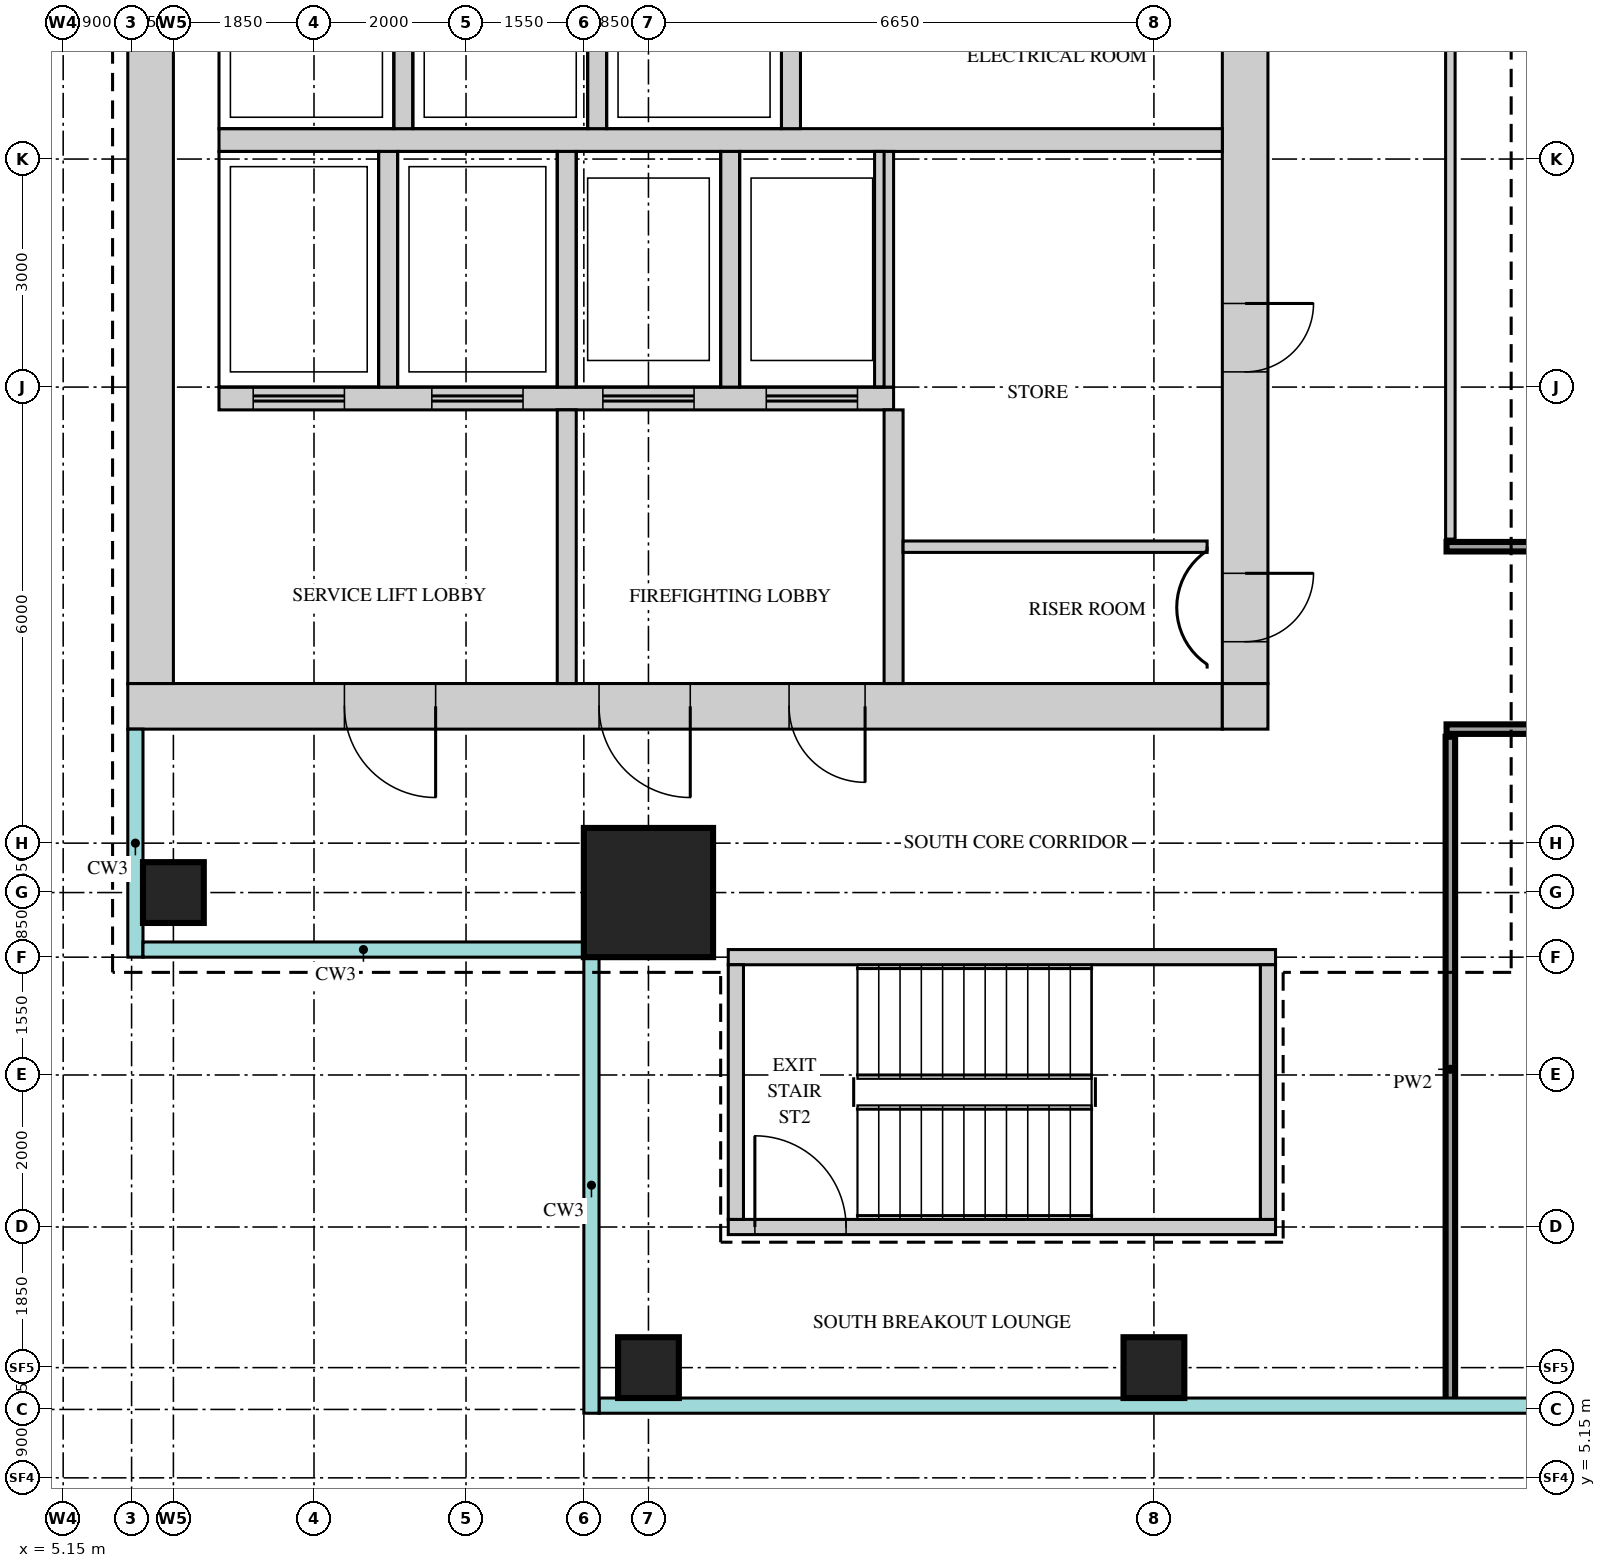
"""IFC4 building model, lengths in metres.
Left out: names, types, materials, properties, quantities, classifications, styles, units other than length and angle.
Written with IfcOpenShell. Run it as: python <this file> out.ifc"""

import sys

from ifc_helpers import new_model, si_unit, direction, frame, frame_2d, origin, origin_2d, place, context, subcontext, project, spatial, rectangle, extrude, source, transform, mapped, element, fill, save


model = new_model("IFC4")
c1 = context("Model", 3, precision=1e-05, world=origin(), true_north=direction((0.0, 1.0)))
c2 = subcontext(c1, "Body", "Model", "MODEL_VIEW")
j1 = project(units=[si_unit("LENGTHUNIT", "METRE"), si_unit("PLANEANGLEUNIT", "RADIAN")], contexts=[c1])
p1 = place(None, origin())
s1 = spatial("IfcSite", under=j1, at=p1, CompositionType="ELEMENT")
p2 = place(p1, origin())
s2 = spatial("IfcBuilding", under=s1, at=p2, CompositionType="ELEMENT")
p3 = place(p2, frame((0.0, 0.0, 326.2)))
s3 = spatial("IfcBuildingStorey", under=s2, at=p3, CompositionType="ELEMENT", Elevation=326.2)
m1 = source(origin(), c2, "Body", "SweptSolid", [
    extrude(rectangle(XDim=14.4, YDim=0.6, at=frame_2d((7.2, 0.0))), origin(), (0.0, 0.0, 1.0), 3.75),
])
p4 = place(p3, frame((6.0, 15.3, 0.0), z_axis=(0.0, 0.0, 1.0), x_axis=(1.0, 0.0, 0.0)))
e1 = element("IfcWall", 1, at=p4, inside=s3, PredefinedType="SHEAR", context=c2, shape_type="MappedRepresentation", body=[
    mapped(m1, transform((0.0, 0.0, 0.0))),
])
m2 = source(origin(), c2, "Body", "SweptSolid", [
    extrude(rectangle(XDim=1.2, YDim=2.1, at=frame_2d((0.6, 1.05))), frame((0.0, 0.31, 0.0), z_axis=(0.0, -1.0, 0.0), x_axis=(1.0, 0.0, 0.0)), (0.0, 0.0, 1.0), 0.62),
])
p5 = place(p4, frame((6.2, 0.0, 0.0)))
e2 = element("IfcOpeningElement", 2, at=p5, cuts=e1, PredefinedType="OPENING", context=c2, shape_type="MappedRepresentation", body=[
    mapped(m2, transform((0.0, 0.0, 0.0))),
])
p6 = place(p4, frame((2.85, 0.0, 0.0)))
e3 = element("IfcOpeningElement", 3, at=p6, cuts=e1, PredefinedType="OPENING", context=c2, shape_type="MappedRepresentation", body=[
    mapped(m2, transform((0.0, 0.0, 0.0))),
])
m3 = source(origin(), c2, "Body", "SweptSolid", [
    extrude(rectangle(XDim=1.0, YDim=2.1, at=frame_2d((0.5, 1.05))), frame((0.0, 0.31, 0.0), z_axis=(0.0, -1.0, 0.0), x_axis=(1.0, 0.0, 0.0)), (0.0, 0.0, 1.0), 0.62),
])
p7 = place(p4, frame((8.7, 0.0, 0.0)))
e4 = element("IfcOpeningElement", 4, at=p7, cuts=e1, PredefinedType="OPENING", context=c2, shape_type="MappedRepresentation", body=[
    mapped(m3, transform((0.0, 0.0, 0.0))),
])
m4 = source(origin(), c2, "Body", "SweptSolid", [
    extrude(rectangle(XDim=0.6, YDim=0.6, at=frame_2d((0.3, 0.0))), origin(), (0.0, 0.0, 1.0), 3.75),
])
p8 = place(p3, frame((20.4, 15.3, 0.0), z_axis=(0.0, 0.0, 1.0), x_axis=(1.0, 0.0, 0.0)))
e5 = element("IfcWall", 5, at=p8, inside=s3, PredefinedType="SHEAR", context=c2, shape_type="MappedRepresentation", body=[
    mapped(m4, transform((0.0, 0.0, 0.0))),
])
m5 = source(origin(), c2, "Body", "SweptSolid", [
    extrude(rectangle(XDim=22.8, YDim=0.6, at=frame_2d((11.4, 0.0))), origin(), (0.0, 0.0, 1.0), 3.75),
])
p9 = place(p3, frame((20.7, 15.6, 0.0), z_axis=(0.0, 0.0, 1.0), x_axis=(0.0, 1.0, 0.0)))
e6 = element("IfcWall", 6, at=p9, inside=s3, PredefinedType="SHEAR", context=c2, shape_type="MappedRepresentation", body=[
    mapped(m5, transform((0.0, 0.0, 0.0))),
])
m6 = source(origin(), c2, "Body", "SweptSolid", [
    extrude(rectangle(XDim=1.8, YDim=2.1, at=frame_2d((0.9, 1.05))), frame((0.0, 0.31, 0.0), z_axis=(0.0, -1.0, 0.0), x_axis=(1.0, 0.0, 0.0)), (0.0, 0.0, 1.0), 0.62),
])
p10 = place(p9, frame((10.9, 0.0, 0.0)))
e7 = element("IfcOpeningElement", 7, at=p10, cuts=e6, PredefinedType="OPENING", context=c2, shape_type="MappedRepresentation", body=[
    mapped(m6, transform((0.0, 0.0, 0.0))),
])
m7 = source(origin(), c2, "Body", "SweptSolid", [
    extrude(rectangle(XDim=0.9, YDim=2.1, at=frame_2d((0.45, 1.05))), frame((0.0, 0.31, 0.0), z_axis=(0.0, -1.0, 0.0), x_axis=(1.0, 0.0, 0.0)), (0.0, 0.0, 1.0), 0.62),
])
p11 = place(p9, frame((0.55, 0.0, 0.0)))
e8 = element("IfcOpeningElement", 8, at=p11, cuts=e6, PredefinedType="OPENING", context=c2, shape_type="MappedRepresentation", body=[
    mapped(m7, transform((0.0, 0.0, 0.0))),
])
p12 = place(p9, frame((4.1, 0.0, 0.0)))
e9 = element("IfcOpeningElement", 9, at=p12, cuts=e6, PredefinedType="OPENING", context=c2, shape_type="MappedRepresentation", body=[
    mapped(m7, transform((0.0, 0.0, 0.0))),
])
p13 = place(p3, frame((6.3, 15.6, 0.0), z_axis=(0.0, 0.0, 1.0), x_axis=(0.0, 1.0, 0.0)))
e10 = element("IfcWall", 10, at=p13, inside=s3, PredefinedType="SHEAR", context=c2, shape_type="MappedRepresentation", body=[
    mapped(m5, transform((0.0, 0.0, 0.0))),
])
m8 = source(origin(), c2, "Body", "SweptSolid", [
    extrude(rectangle(XDim=7.2, YDim=0.2, at=frame_2d((3.6, 0.0))), origin(), (0.0, 0.0, 1.0), 3.75),
])
p14 = place(p3, frame((13.9, 12.0, 0.0), z_axis=(0.0, 0.0, 1.0), x_axis=(1.0, 0.0, 0.0)))
e11 = element("IfcWall", 11, at=p14, inside=s3, PredefinedType="SHEAR", context=c2, shape_type="MappedRepresentation", body=[
    mapped(m8, transform((0.0, 0.0, 0.0))),
])
p15 = place(p3, frame((13.9, 8.45, 0.0), z_axis=(0.0, 0.0, 1.0), x_axis=(1.0, 0.0, 0.0)))
e12 = element("IfcWall", 12, at=p15, inside=s3, PredefinedType="SHEAR", context=c2, shape_type="MappedRepresentation", body=[
    mapped(m8, transform((0.0, 0.0, 0.0))),
])
m9 = source(origin(), c2, "Body", "SweptSolid", [
    extrude(rectangle(XDim=1.2, YDim=2.1, at=frame_2d((0.6, 1.05))), frame((0.0, 0.11, 0.0), z_axis=(0.0, -1.0, 0.0), x_axis=(1.0, 0.0, 0.0)), (0.0, 0.0, 1.0), 0.22),
])
p16 = place(p15, frame((0.35, 0.0, 0.0)))
e13 = element("IfcOpeningElement", 13, at=p16, cuts=e12, PredefinedType="OPENING", context=c2, shape_type="MappedRepresentation", body=[
    mapped(m9, transform((0.0, 0.0, 0.0))),
])
m10 = source(origin(), c2, "Body", "SweptSolid", [
    extrude(rectangle(XDim=3.35, YDim=0.2, at=frame_2d((1.675, 0.0))), origin(), (0.0, 0.0, 1.0), 3.75),
])
for number, where, z_axis, x_axis in (
    (14, (21.0, 8.55, 0.0), (0.0, 0.0, 1.0), (0.0, 1.0, 0.0)),
    (15, (14.0, 8.55, 0.0), (0.0, 0.0, 1.0), (0.0, 1.0, 0.0)),
):
    element("IfcWall", number, at=place(p3, frame(where, z_axis=z_axis, x_axis=x_axis)), inside=s3, PredefinedType="SHEAR", context=c2, shape_type="MappedRepresentation", body=[
        mapped(m10, transform((0.0, 0.0, 0.0))),
    ])
m11 = source(origin(), c2, "Body", "SweptSolid", [
    extrude(rectangle(XDim=13.2, YDim=0.3, at=frame_2d((6.6, 0.0))), origin(), (0.0, 0.0, 1.0), 3.75),
])
p17 = place(p3, frame((7.2, 22.75, 0.0), z_axis=(0.0, 0.0, 1.0), x_axis=(1.0, 0.0, 0.0)))
e16 = element("IfcWall", 16, at=p17, inside=s3, PredefinedType="STANDARD", context=c2, shape_type="MappedRepresentation", body=[
    mapped(m11, transform((0.0, 0.0, 0.0))),
])
m12 = source(origin(), c2, "Body", "SweptSolid", [
    extrude(rectangle(XDim=8.875, YDim=0.3, at=frame_2d((4.438, 0.0))), origin(), (0.0, 0.0, 1.0), 3.75),
])
p18 = place(p3, frame((7.2, 19.35, 0.0), z_axis=(0.0, 0.0, 1.0), x_axis=(1.0, 0.0, 0.0)))
e17 = element("IfcWall", 17, at=p18, inside=s3, PredefinedType="STANDARD", context=c2, shape_type="MappedRepresentation", body=[
    mapped(m12, transform((0.0, 0.0, 0.0))),
])
m13 = source(origin(), c2, "Body", "SweptSolid", [
    extrude(rectangle(XDim=1.2, YDim=2.1, at=frame_2d((0.6, 1.05))), frame((0.0, 0.16, 0.0), z_axis=(0.0, -1.0, 0.0), x_axis=(1.0, 0.0, 0.0)), (0.0, 0.0, 1.0), 0.32),
])
p19 = place(p18, frame((0.45, 0.0, 0.0)))
e18 = element("IfcOpeningElement", 18, at=p19, cuts=e17, PredefinedType="OPENING", context=c2, shape_type="MappedRepresentation", body=[
    mapped(m13, transform((0.0, 0.0, 0.0))),
])
p20 = place(p18, frame((2.8, 0.0, 0.0)))
e19 = element("IfcOpeningElement", 19, at=p20, cuts=e17, PredefinedType="OPENING", context=c2, shape_type="MappedRepresentation", body=[
    mapped(m13, transform((0.0, 0.0, 0.0))),
])
p21 = place(p18, frame((5.05, 0.0, 0.0)))
e20 = element("IfcOpeningElement", 20, at=p21, cuts=e17, PredefinedType="OPENING", context=c2, shape_type="MappedRepresentation", body=[
    mapped(m13, transform((0.0, 0.0, 0.0))),
])
p22 = place(p18, frame((7.2, 0.0, 0.0)))
e21 = element("IfcOpeningElement", 21, at=p22, cuts=e17, PredefinedType="OPENING", context=c2, shape_type="MappedRepresentation", body=[
    mapped(m13, transform((0.0, 0.0, 0.0))),
])
m14 = source(origin(), c2, "Body", "SweptSolid", [
    extrude(rectangle(XDim=3.1, YDim=0.25, at=frame_2d((1.55, 0.0))), origin(), (0.0, 0.0, 1.0), 3.75),
])
for number, where, z_axis, x_axis in (
    (22, (9.425, 19.5, 0.0), (0.0, 0.0, 1.0), (0.0, 1.0, 0.0)),
    (23, (11.775, 19.5, 0.0), (0.0, 0.0, 1.0), (0.0, 1.0, 0.0)),
    (24, (13.925, 19.5, 0.0), (0.0, 0.0, 1.0), (0.0, 1.0, 0.0)),
    (25, (15.95, 19.5, 0.0), (0.0, 0.0, 1.0), (0.0, 1.0, 0.0)),
):
    element("IfcWall", number, at=place(p3, frame(where, z_axis=z_axis, x_axis=x_axis)), inside=s3, PredefinedType="STANDARD", context=c2, shape_type="MappedRepresentation", body=[
        mapped(m14, transform((0.0, 0.0, 0.0))),
    ])
m15 = source(origin(), c2, "Body", "SweptSolid", [
    extrude(rectangle(XDim=2.4, YDim=0.25, at=frame_2d((1.2, 0.0))), origin(), (0.0, 0.0, 1.0), 3.75),
])
for number, where, z_axis, x_axis in (
    (26, (9.625, 22.9, 0.0), (0.0, 0.0, 1.0), (0.0, 1.0, 0.0)),
    (27, (12.175, 22.9, 0.0), (0.0, 0.0, 1.0), (0.0, 1.0, 0.0)),
    (28, (14.725, 22.9, 0.0), (0.0, 0.0, 1.0), (0.0, 1.0, 0.0)),
):
    element("IfcWall", number, at=place(p3, frame(where, z_axis=z_axis, x_axis=x_axis)), inside=s3, PredefinedType="STANDARD", context=c2, shape_type="MappedRepresentation", body=[
        mapped(m15, transform((0.0, 0.0, 0.0))),
    ])
m16 = source(origin(), c2, "Body", "SweptSolid", [
    extrude(rectangle(XDim=3.6, YDim=0.25, at=frame_2d((1.8, 0.0))), origin(), (0.0, 0.0, 1.0), 3.75),
])
for number, where, z_axis, x_axis in (
    (29, (16.075, 15.6, 0.0), (0.0, 0.0, 1.0), (0.0, 1.0, 0.0)),
    (30, (11.775, 15.6, 0.0), (0.0, 0.0, 1.0), (0.0, 1.0, 0.0)),
):
    element("IfcWall", number, at=place(p3, frame(where, z_axis=z_axis, x_axis=x_axis)), inside=s3, PredefinedType="STANDARD", context=c2, shape_type="MappedRepresentation", body=[
        mapped(m16, transform((0.0, 0.0, 0.0))),
    ])
m17 = source(origin(), c2, "Body", "SweptSolid", [
    extrude(rectangle(XDim=1.7, YDim=1.7, at=origin_2d()), origin(), (0.0, 0.0, 1.0), 3.75),
])
p23 = place(p3, frame((12.85, 12.85, 0.0), z_axis=(0.0, 0.0, 1.0), x_axis=(1.0, 0.0, 0.0)))
e31 = element("IfcColumn", 31, at=p23, inside=s3, PredefinedType="COLUMN", context=c2, shape_type="MappedRepresentation", body=[
    mapped(m17, transform((0.0, 0.0, 0.0))),
])
m18 = source(origin(), c2, "Body", "SweptSolid", [
    extrude(rectangle(XDim=0.8, YDim=0.8, at=origin_2d()), origin(), (0.0, 0.0, 1.0), 3.75),
])
for number, where, z_axis, x_axis in (
    (32, (12.85, 6.6, 0.0), (0.0, 0.0, 1.0), (1.0, 0.0, 0.0)),
    (33, (19.5, 6.6, 0.0), (0.0, 0.0, 1.0), (1.0, 0.0, 0.0)),
    (34, (6.6, 12.85, 0.0), (0.0, 0.0, 1.0), (1.0, 0.0, 0.0)),
):
    element("IfcColumn", number, at=place(p3, frame(where, z_axis=z_axis, x_axis=x_axis)), inside=s3, PredefinedType="COLUMN", context=c2, shape_type="MappedRepresentation", body=[
        mapped(m18, transform((0.0, 0.0, 0.0))),
    ])
m19 = source(origin(), c2, "Body", "SweptSolid", [
    extrude(rectangle(XDim=8.75, YDim=0.125, at=frame_2d((4.375, 0.0))), origin(), (0.0, 0.0, 1.0), 3.8),
])
p24 = place(p3, frame((23.4, 6.15, 0.0), z_axis=(0.0, 0.0, 1.0), x_axis=(0.0, 1.0, 0.0)))
e35 = element("IfcWall", 35, at=p24, inside=s3, PredefinedType="PARTITIONING", context=c2, shape_type="MappedRepresentation", body=[
    mapped(m19, transform((0.0, 0.0, 0.0))),
])
m20 = source(origin(), c2, "Body", "SweptSolid", [
    extrude(rectangle(XDim=19.1, YDim=0.125, at=frame_2d((9.55, 0.0))), origin(), (0.0, 0.0, 1.0), 3.8),
])
p25 = place(p3, frame((23.35, 15.0, 0.0), z_axis=(0.0, 0.0, 1.0), x_axis=(1.0, 0.0, 0.0)))
e36 = element("IfcWall", 36, at=p25, inside=s3, PredefinedType="PARTITIONING", context=c2, shape_type="MappedRepresentation", body=[
    mapped(m20, transform((0.0, 0.0, 0.0))),
])
m21 = source(origin(), c2, "Body", "SweptSolid", [
    extrude(rectangle(XDim=0.9, YDim=2.1, at=frame_2d((0.45, 1.05))), frame((0.0, 0.073, 0.0), z_axis=(0.0, -1.0, 0.0), x_axis=(1.0, 0.0, 0.0)), (0.0, 0.0, 1.0), 0.145),
])
p26 = place(p25, frame((5.3, 0.0, 0.0)))
e37 = element("IfcOpeningElement", 37, at=p26, cuts=e36, PredefinedType="OPENING", context=c2, shape_type="MappedRepresentation", body=[
    mapped(m21, transform((0.0, 0.0, 0.0))),
])
p27 = place(p25, frame((13.3, 0.0, 0.0)))
e38 = element("IfcOpeningElement", 38, at=p27, cuts=e36, PredefinedType="OPENING", context=c2, shape_type="MappedRepresentation", body=[
    mapped(m21, transform((0.0, 0.0, 0.0))),
])
m22 = source(origin(), c2, "Body", "SweptSolid", [
    extrude(rectangle(XDim=4.0, YDim=0.15, at=frame_2d((2.0, 0.0))), origin(), (0.0, 0.0, 1.0), 3.8),
])
p28 = place(p3, frame((16.2, 17.4, 0.0), z_axis=(0.0, 0.0, 1.0), x_axis=(1.0, 0.0, 0.0)))
e39 = element("IfcWall", 39, at=p28, inside=s3, PredefinedType="PARTITIONING", context=c2, shape_type="MappedRepresentation", body=[
    mapped(m22, transform((0.0, 0.0, 0.0))),
])
m23 = source(origin(), c2, "Body", "SweptSolid", [
    extrude(rectangle(XDim=16.7, YDim=0.125, at=frame_2d((8.35, 0.0))), origin(), (0.0, 0.0, 1.0), 3.8),
])
p29 = place(p3, frame((23.35, 17.4, 0.0), z_axis=(0.0, 0.0, 1.0), x_axis=(1.0, 0.0, 0.0)))
e40 = element("IfcWall", 40, at=p29, inside=s3, PredefinedType="PARTITIONING", context=c2, shape_type="MappedRepresentation", body=[
    mapped(m23, transform((0.0, 0.0, 0.0))),
])
m24 = source(origin(), c2, "Body", "SweptSolid", [
    extrude(rectangle(XDim=19.0, YDim=0.125, at=frame_2d((9.5, 0.0))), origin(), (0.0, 0.0, 1.0), 3.8),
])
p30 = place(p3, frame((23.4, 17.5, 0.0), z_axis=(0.0, 0.0, 1.0), x_axis=(0.0, 1.0, 0.0)))
e41 = element("IfcWall", 41, at=p30, inside=s3, PredefinedType="PARTITIONING", context=c2, shape_type="MappedRepresentation", body=[
    mapped(m24, transform((0.0, 0.0, 0.0))),
])
m25 = source(origin(), c2, "Body", "SweptSolid", [
    extrude(rectangle(XDim=1.2, YDim=2.1, at=frame_2d((0.6, 1.05))), frame((0.0, 0.073, 0.0), z_axis=(0.0, -1.0, 0.0), x_axis=(1.0, 0.0, 0.0)), (0.0, 0.0, 1.0), 0.145),
])
p31 = place(p30, frame((8.9, 0.0, 0.0)))
e42 = element("IfcOpeningElement", 42, at=p31, cuts=e41, PredefinedType="OPENING", context=c2, shape_type="MappedRepresentation", body=[
    mapped(m25, transform((0.0, 0.0, 0.0))),
])
p32 = place(p30, frame((17.95, 0.0, 0.0)))
e43 = element("IfcOpeningElement", 43, at=p32, cuts=e41, PredefinedType="OPENING", context=c2, shape_type="MappedRepresentation", body=[
    mapped(m21, transform((0.0, 0.0, 0.0))),
])
m26 = source(origin(), c2, "Body", "SweptSolid", [
    extrude(rectangle(XDim=0.9, YDim=2.1, at=frame_2d((0.45, 1.05))), frame((0.0, 0.25, 0.0), z_axis=(0.0, -1.0, 0.0), x_axis=(1.0, 0.0, 0.0)), (0.0, 0.0, 1.0), 0.5),
])
p33 = place(p11, origin())
e44 = element("IfcDoor", 44, at=p33, inside=s3, OperationType="SINGLE_SWING_RIGHT", PredefinedType="DOOR", context=c2, shape_type="MappedRepresentation", body=[
    mapped(m26, transform((0.0, 0.0, 0.0))),
])
fill(e8, e44)
p34 = place(p12, origin())
e45 = element("IfcDoor", 45, at=p34, inside=s3, OperationType="SINGLE_SWING_RIGHT", PredefinedType="DOOR", context=c2, shape_type="MappedRepresentation", body=[
    mapped(m26, transform((0.0, 0.0, 0.0))),
])
fill(e9, e45)
m27 = source(origin(), c2, "Body", "SweptSolid", [
    extrude(rectangle(XDim=1.2, YDim=2.1, at=frame_2d((0.6, 1.05))), frame((0.0, 0.25, 0.0), z_axis=(0.0, -1.0, 0.0), x_axis=(1.0, 0.0, 0.0)), (0.0, 0.0, 1.0), 0.5),
])
p35 = place(p5, origin())
e46 = element("IfcDoor", 46, at=p35, inside=s3, OperationType="SINGLE_SWING_RIGHT", PredefinedType="DOOR", context=c2, shape_type="MappedRepresentation", body=[
    mapped(m27, transform((0.0, 0.0, 0.0))),
])
fill(e2, e46)
p36 = place(p6, origin())
e47 = element("IfcDoor", 47, at=p36, inside=s3, OperationType="SINGLE_SWING_RIGHT", PredefinedType="DOOR", context=c2, shape_type="MappedRepresentation", body=[
    mapped(m27, transform((0.0, 0.0, 0.0))),
])
fill(e3, e47)
m28 = source(origin(), c2, "Body", "SweptSolid", [
    extrude(rectangle(XDim=1.0, YDim=2.1, at=frame_2d((0.5, 1.05))), frame((0.0, 0.25, 0.0), z_axis=(0.0, -1.0, 0.0), x_axis=(1.0, 0.0, 0.0)), (0.0, 0.0, 1.0), 0.5),
])
p37 = place(p7, origin())
e48 = element("IfcDoor", 48, at=p37, inside=s3, OperationType="SINGLE_SWING_RIGHT", PredefinedType="DOOR", context=c2, shape_type="MappedRepresentation", body=[
    mapped(m28, transform((0.0, 0.0, 0.0))),
])
fill(e4, e48)
m29 = source(origin(), c2, "Body", "SweptSolid", [
    extrude(rectangle(XDim=1.2, YDim=2.1, at=frame_2d((0.6, 1.05))), frame((0.0, 0.025, 0.0), z_axis=(0.0, -1.0, 0.0), x_axis=(1.0, 0.0, 0.0)), (0.0, 0.0, 1.0), 0.05),
])
p38 = place(p16, origin())
e49 = element("IfcDoor", 49, at=p38, inside=s3, OperationType="SINGLE_SWING_RIGHT", PredefinedType="DOOR", context=c2, shape_type="MappedRepresentation", body=[
    mapped(m29, transform((0.0, 0.0, 0.0))),
])
fill(e13, e49)
p39 = place(p19, origin())
e50 = element("IfcDoor", 50, at=p39, inside=s3, OperationType="DOUBLE_DOOR_SLIDING", PredefinedType="DOOR", context=c2, shape_type="MappedRepresentation", body=[
    mapped(m29, transform((0.0, 0.0, 0.0))),
])
fill(e18, e50)
p40 = place(p20, origin())
e51 = element("IfcDoor", 51, at=p40, inside=s3, OperationType="DOUBLE_DOOR_SLIDING", PredefinedType="DOOR", context=c2, shape_type="MappedRepresentation", body=[
    mapped(m29, transform((0.0, 0.0, 0.0))),
])
fill(e19, e51)
p41 = place(p21, origin())
e52 = element("IfcDoor", 52, at=p41, inside=s3, OperationType="DOUBLE_DOOR_SLIDING", PredefinedType="DOOR", context=c2, shape_type="MappedRepresentation", body=[
    mapped(m29, transform((0.0, 0.0, 0.0))),
])
fill(e20, e52)
p42 = place(p22, origin())
e53 = element("IfcDoor", 53, at=p42, inside=s3, OperationType="DOUBLE_DOOR_SLIDING", PredefinedType="DOOR", context=c2, shape_type="MappedRepresentation", body=[
    mapped(m29, transform((0.0, 0.0, 0.0))),
])
fill(e21, e53)
save(model, sys.argv[1])
